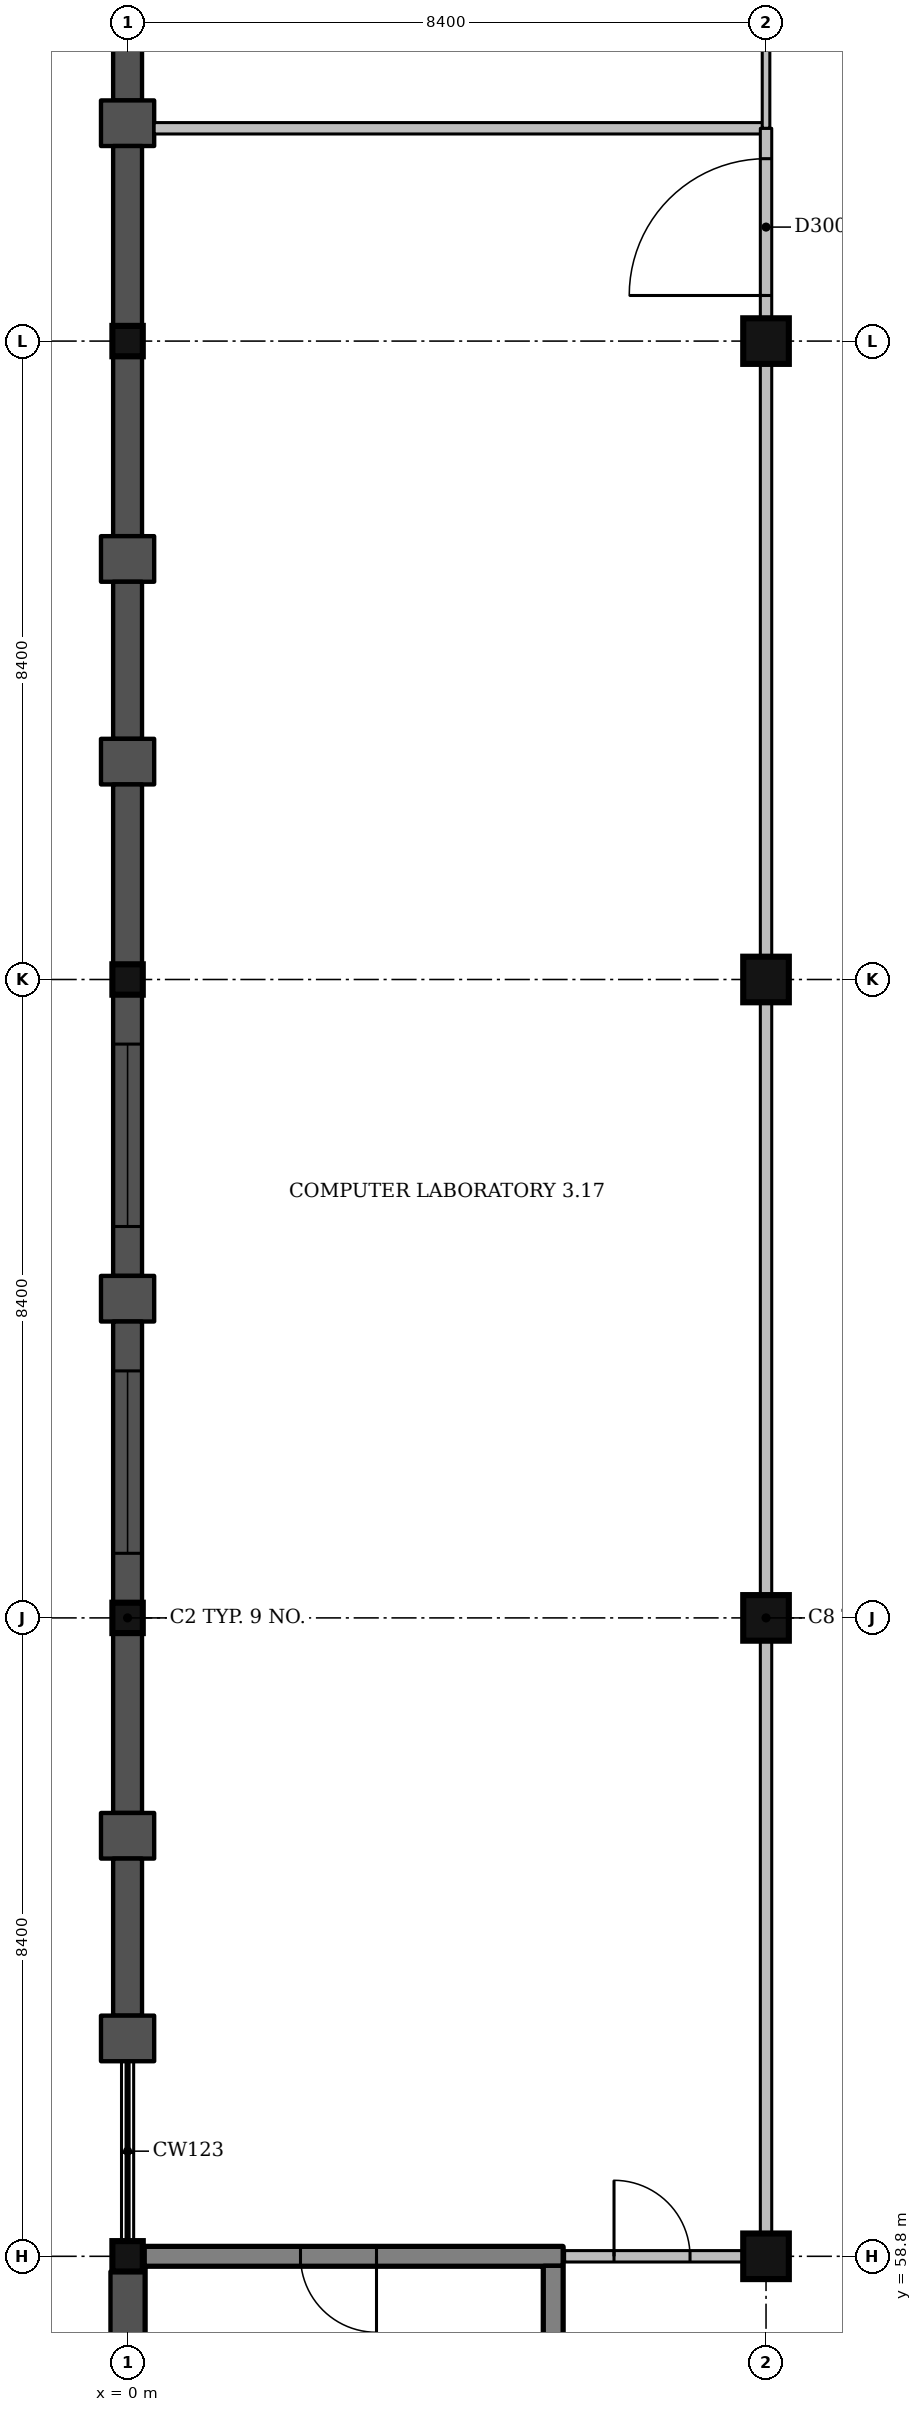
"""IFC4 building model, lengths in metres.
Left out: names, types, materials, properties, quantities, classifications, styles, units other than length and angle.
Written with IfcOpenShell. Run it as: python <this file> out.ifc"""

import sys

from ifc_helpers import new_model, si_unit, direction, frame, frame_2d, origin, origin_2d, place, context, subcontext, project, spatial, rectangle, extrude, element, fill, save


model = new_model("IFC4")
c1 = context("Model", 3, precision=1e-05, world=origin(), true_north=direction((0.0, 1.0)))
c2 = subcontext(c1, "Body", "Model", "MODEL_VIEW")
j1 = project(units=[si_unit("LENGTHUNIT", "METRE"), si_unit("PLANEANGLEUNIT", "RADIAN")], contexts=[c1])
p1 = place(None, origin())
s1 = spatial("IfcSite", under=j1, at=p1, CompositionType="ELEMENT")
p2 = place(p1, origin())
s2 = spatial("IfcBuilding", under=s1, at=p2, CompositionType="ELEMENT")
p3 = place(p2, frame((0.0, 0.0, 13.5)))
s3 = spatial("IfcBuildingStorey", under=s2, at=p3, CompositionType="ELEMENT", Elevation=13.5)
for number, where, z_axis, x_axis in (
    (1, (0.0, 58.8, 0.0), (0.0, 0.0, 1.0), (1.0, 0.0, 0.0)),
    (2, (0.0, 67.2, 0.0), (0.0, 0.0, 1.0), (1.0, 0.0, 0.0)),
    (3, (0.0, 75.6, 0.0), (0.0, 0.0, 1.0), (1.0, 0.0, 0.0)),
    (4, (0.0, 84.0, 0.0), (0.0, 0.0, 1.0), (1.0, 0.0, 0.0)),
):
    element("IfcColumn", number, at=place(p3, frame(where, z_axis=z_axis, x_axis=x_axis)), inside=s3, PredefinedType="COLUMN", context=c2, shape_type="SweptSolid", body=[
        extrude(rectangle(XDim=0.4, YDim=0.4, at=origin_2d()), origin(), (0.0, 0.0, 1.0), 4.5),
    ])
for number, where, z_axis, x_axis in (
    (5, (8.4, 58.8, 0.0), (0.0, 0.0, 1.0), (1.0, 0.0, 0.0)),
    (6, (8.4, 67.2, 0.0), (0.0, 0.0, 1.0), (1.0, 0.0, 0.0)),
    (7, (8.4, 75.6, 0.0), (0.0, 0.0, 1.0), (1.0, 0.0, 0.0)),
    (8, (8.4, 84.0, 0.0), (0.0, 0.0, 1.0), (1.0, 0.0, 0.0)),
):
    element("IfcColumn", number, at=place(p3, frame(where, z_axis=z_axis, x_axis=x_axis)), inside=s3, PredefinedType="COLUMN", context=c2, shape_type="SweptSolid", body=[
        extrude(rectangle(XDim=0.6, YDim=0.6, at=origin_2d()), origin(), (0.0, 0.0, 1.0), 4.5),
    ])
p4 = place(p3, frame((0.225, 58.8, 0.0), z_axis=(0.0, 0.0, 1.0), x_axis=(1.0, 0.0, 0.0)))
e9 = element("IfcWall", 9, at=p4, inside=s3, PredefinedType="SHEAR", context=c2, shape_type="SweptSolid", body=[
    extrude(rectangle(XDim=5.5, YDim=0.25, at=frame_2d((2.75, 0.0))), origin(), (0.0, 0.0, 1.0), 4.5),
])
p5 = place(p4, frame((2.05, 0.0, 0.0)))
e10 = element("IfcOpeningElement", 10, at=p5, cuts=e9, PredefinedType="OPENING", context=c2, shape_type="SweptSolid", body=[
    extrude(rectangle(XDim=1.0, YDim=2.1, at=frame_2d((0.5, 1.05))), frame((0.0, 0.135, 0.0), z_axis=(0.0, -1.0, 0.0), x_axis=(1.0, 0.0, 0.0)), (0.0, 0.0, 1.0), 0.27),
])
p6 = place(p3, frame((5.6, 54.61, 0.0), z_axis=(0.0, 0.0, 1.0), x_axis=(0.0, 1.0, 0.0)))
e11 = element("IfcWall", 11, at=p6, inside=s3, PredefinedType="SHEAR", context=c2, shape_type="SweptSolid", body=[
    extrude(rectangle(XDim=4.065, YDim=0.25, at=frame_2d((2.032, 0.0))), origin(), (0.0, 0.0, 1.0), 4.5),
])
p7 = place(p3, frame((0.0, 89.233, 0.0), z_axis=(0.0, 0.0, 1.0), x_axis=(0.0, -1.0, 0.0)))
e12 = element("IfcWall", 12, at=p7, inside=s3, PredefinedType="SOLIDWALL", context=c2, shape_type="SweptSolid", body=[
    extrude(rectangle(XDim=2.067, YDim=0.38, at=frame_2d((1.033, 0.0))), origin(), (0.0, 0.0, 1.0), 3.35),
])
p8 = place(p7, frame((0.733, 0.0, 1.5)))
e13 = element("IfcOpeningElement", 13, at=p8, cuts=e12, PredefinedType="OPENING", context=c2, shape_type="SweptSolid", body=[
    extrude(rectangle(XDim=0.6, YDim=1.2, at=frame_2d((0.3, 0.6))), frame((0.0, 0.2, 0.0), z_axis=(0.0, -1.0, 0.0), x_axis=(1.0, 0.0, 0.0)), (0.0, 0.0, 1.0), 0.4),
])
p9 = place(p3, frame((0.0, 87.167, 0.0), z_axis=(0.0, 0.0, 1.0), x_axis=(0.0, -1.0, 0.0)))
e14 = element("IfcWall", 14, at=p9, inside=s3, PredefinedType="SOLIDWALL", context=c2, shape_type="SweptSolid", body=[
    extrude(rectangle(XDim=0.6, YDim=0.7, at=frame_2d((0.3, 0.0))), origin(), (0.0, 0.0, 1.0), 3.35),
])
for number, where, z_axis, x_axis in (
    (15, (0.0, 86.567, 0.0), (0.0, 0.0, 1.0), (0.0, -1.0, 0.0)),
    (16, (0.0, 83.8, 0.0), (0.0, 0.0, 1.0), (0.0, -1.0, 0.0)),
):
    element("IfcWall", number, at=place(p3, frame(where, z_axis=z_axis, x_axis=x_axis)), inside=s3, PredefinedType="SOLIDWALL", context=c2, shape_type="SweptSolid", body=[
        extrude(rectangle(XDim=2.367, YDim=0.38, at=frame_2d((1.183, 0.0))), origin(), (0.0, 0.0, 1.0), 3.35),
    ])
p10 = place(p3, frame((0.0, 81.433, 0.0), z_axis=(0.0, 0.0, 1.0), x_axis=(0.0, -1.0, 0.0)))
e17 = element("IfcWall", 17, at=p10, inside=s3, PredefinedType="SOLIDWALL", context=c2, shape_type="SweptSolid", body=[
    extrude(rectangle(XDim=0.6, YDim=0.7, at=frame_2d((0.3, 0.0))), origin(), (0.0, 0.0, 1.0), 3.35),
])
p11 = place(p3, frame((0.0, 80.833, 0.0), z_axis=(0.0, 0.0, 1.0), x_axis=(0.0, -1.0, 0.0)))
e18 = element("IfcWall", 18, at=p11, inside=s3, PredefinedType="SOLIDWALL", context=c2, shape_type="SweptSolid", body=[
    extrude(rectangle(XDim=2.067, YDim=0.38, at=frame_2d((1.033, 0.0))), origin(), (0.0, 0.0, 1.0), 3.35),
])
p12 = place(p3, frame((0.0, 78.767, 0.0), z_axis=(0.0, 0.0, 1.0), x_axis=(0.0, -1.0, 0.0)))
e19 = element("IfcWall", 19, at=p12, inside=s3, PredefinedType="SOLIDWALL", context=c2, shape_type="SweptSolid", body=[
    extrude(rectangle(XDim=0.6, YDim=0.7, at=frame_2d((0.3, 0.0))), origin(), (0.0, 0.0, 1.0), 3.35),
])
p13 = place(p3, frame((0.0, 78.167, 0.0), z_axis=(0.0, 0.0, 1.0), x_axis=(0.0, -1.0, 0.0)))
e20 = element("IfcWall", 20, at=p13, inside=s3, PredefinedType="SOLIDWALL", context=c2, shape_type="SweptSolid", body=[
    extrude(rectangle(XDim=2.367, YDim=0.38, at=frame_2d((1.183, 0.0))), origin(), (0.0, 0.0, 1.0), 3.35),
])
p14 = place(p3, frame((0.0, 75.4, 0.0), z_axis=(0.0, 0.0, 1.0), x_axis=(0.0, -1.0, 0.0)))
e21 = element("IfcWall", 21, at=p14, inside=s3, PredefinedType="SOLIDWALL", context=c2, shape_type="SweptSolid", body=[
    extrude(rectangle(XDim=3.7, YDim=0.38, at=frame_2d((1.85, 0.0))), origin(), (0.0, 0.0, 1.0), 3.35),
])
p15 = place(p14, frame((0.65, 0.0, 1.2)))
e22 = element("IfcOpeningElement", 22, at=p15, cuts=e21, PredefinedType="OPENING", context=c2, shape_type="SweptSolid", body=[
    extrude(rectangle(XDim=2.4, YDim=1.5, at=frame_2d((1.2, 0.75))), frame((0.0, 0.2, 0.0), z_axis=(0.0, -1.0, 0.0), x_axis=(1.0, 0.0, 0.0)), (0.0, 0.0, 1.0), 0.4),
])
p16 = place(p3, frame((0.0, 71.7, 0.0), z_axis=(0.0, 0.0, 1.0), x_axis=(0.0, -1.0, 0.0)))
e23 = element("IfcWall", 23, at=p16, inside=s3, PredefinedType="SOLIDWALL", context=c2, shape_type="SweptSolid", body=[
    extrude(rectangle(XDim=0.6, YDim=0.7, at=frame_2d((0.3, 0.0))), origin(), (0.0, 0.0, 1.0), 3.35),
])
p17 = place(p3, frame((0.0, 71.1, 0.0), z_axis=(0.0, 0.0, 1.0), x_axis=(0.0, -1.0, 0.0)))
e24 = element("IfcWall", 24, at=p17, inside=s3, PredefinedType="SOLIDWALL", context=c2, shape_type="SweptSolid", body=[
    extrude(rectangle(XDim=3.7, YDim=0.38, at=frame_2d((1.85, 0.0))), origin(), (0.0, 0.0, 1.0), 3.35),
])
p18 = place(p17, frame((0.65, 0.0, 1.2)))
e25 = element("IfcOpeningElement", 25, at=p18, cuts=e24, PredefinedType="OPENING", context=c2, shape_type="SweptSolid", body=[
    extrude(rectangle(XDim=2.4, YDim=1.5, at=frame_2d((1.2, 0.75))), frame((0.0, 0.2, 0.0), z_axis=(0.0, -1.0, 0.0), x_axis=(1.0, 0.0, 0.0)), (0.0, 0.0, 1.0), 0.4),
])
p19 = place(p3, frame((0.0, 67.0, 0.0), z_axis=(0.0, 0.0, 1.0), x_axis=(0.0, -1.0, 0.0)))
e26 = element("IfcWall", 26, at=p19, inside=s3, PredefinedType="SOLIDWALL", context=c2, shape_type="SweptSolid", body=[
    extrude(rectangle(XDim=2.367, YDim=0.38, at=frame_2d((1.183, 0.0))), origin(), (0.0, 0.0, 1.0), 3.35),
])
p20 = place(p3, frame((0.0, 64.633, 0.0), z_axis=(0.0, 0.0, 1.0), x_axis=(0.0, -1.0, 0.0)))
e27 = element("IfcWall", 27, at=p20, inside=s3, PredefinedType="SOLIDWALL", context=c2, shape_type="SweptSolid", body=[
    extrude(rectangle(XDim=0.6, YDim=0.7, at=frame_2d((0.3, 0.0))), origin(), (0.0, 0.0, 1.0), 3.35),
])
p21 = place(p3, frame((0.0, 64.033, 0.0), z_axis=(0.0, 0.0, 1.0), x_axis=(0.0, -1.0, 0.0)))
e28 = element("IfcWall", 28, at=p21, inside=s3, PredefinedType="SOLIDWALL", context=c2, shape_type="SweptSolid", body=[
    extrude(rectangle(XDim=2.066, YDim=0.38, at=frame_2d((1.033, 0.0))), origin(), (0.0, 0.0, 1.0), 3.35),
])
p22 = place(p3, frame((0.0, 61.967, 0.0), z_axis=(0.0, 0.0, 1.0), x_axis=(0.0, -1.0, 0.0)))
e29 = element("IfcWall", 29, at=p22, inside=s3, PredefinedType="SOLIDWALL", context=c2, shape_type="SweptSolid", body=[
    extrude(rectangle(XDim=0.6, YDim=0.7, at=frame_2d((0.3, 0.0))), origin(), (0.0, 0.0, 1.0), 3.35),
])
p23 = place(p3, frame((0.0, 58.6, 0.0), z_axis=(0.0, 0.0, 1.0), x_axis=(0.0, -1.0, 0.0)))
e30 = element("IfcWall", 30, at=p23, inside=s3, PredefinedType="SOLIDWALL", context=c2, shape_type="SweptSolid", body=[
    extrude(rectangle(XDim=3.675, YDim=0.45, at=frame_2d((1.837, 0.0))), origin(), (0.0, 0.0, 1.0), 4.5),
])
p24 = place(p3, frame((5.75, 58.8, 0.0), z_axis=(0.0, 0.0, 1.0), x_axis=(1.0, 0.0, 0.0)))
e31 = element("IfcWall", 31, at=p24, inside=s3, PredefinedType="PARTITIONING", context=c2, shape_type="SweptSolid", body=[
    extrude(rectangle(XDim=2.35, YDim=0.15, at=frame_2d((1.175, 0.0))), origin(), (0.0, 0.0, 1.0), 3.5),
])
p25 = place(p24, frame((0.65, 0.0, 0.0)))
e32 = element("IfcOpeningElement", 32, at=p25, cuts=e31, PredefinedType="OPENING", context=c2, shape_type="SweptSolid", body=[
    extrude(rectangle(XDim=1.0, YDim=2.1, at=frame_2d((0.5, 1.05))), frame((0.0, 0.085, 0.0), z_axis=(0.0, -1.0, 0.0), x_axis=(1.0, 0.0, 0.0)), (0.0, 0.0, 1.0), 0.17),
])
p26 = place(p3, frame((0.35, 86.8, 0.0), z_axis=(0.0, 0.0, 1.0), x_axis=(1.0, 0.0, 0.0)))
e33 = element("IfcWall", 33, at=p26, inside=s3, PredefinedType="PARTITIONING", context=c2, shape_type="SweptSolid", body=[
    extrude(rectangle(XDim=8.05, YDim=0.15, at=frame_2d((4.025, 0.0))), origin(), (0.0, 0.0, 1.0), 3.4),
])
p27 = place(p3, frame((8.4, 59.1, 0.0), z_axis=(0.0, 0.0, 1.0), x_axis=(0.0, 1.0, 0.0)))
e34 = element("IfcWall", 34, at=p27, inside=s3, PredefinedType="PARTITIONING", context=c2, shape_type="SweptSolid", body=[
    extrude(rectangle(XDim=7.8, YDim=0.15, at=frame_2d((3.9, 0.0))), origin(), (0.0, 0.0, 1.0), 3.4),
])
for number, where, z_axis, x_axis in (
    (35, (8.4, 67.5, 0.0), (0.0, 0.0, 1.0), (0.0, 1.0, 0.0)),
    (36, (8.4, 75.9, 0.0), (0.0, 0.0, 1.0), (0.0, 1.0, 0.0)),
):
    element("IfcWall", number, at=place(p3, frame(where, z_axis=z_axis, x_axis=x_axis)), inside=s3, PredefinedType="PARTITIONING", context=c2, shape_type="SweptSolid", body=[
        extrude(rectangle(XDim=7.8, YDim=0.15, at=frame_2d((3.9, 0.0))), origin(), (0.0, 0.0, 1.0), 3.4),
    ])
p28 = place(p3, frame((8.4, 84.3, 0.0), z_axis=(0.0, 0.0, 1.0), x_axis=(0.0, 1.0, 0.0)))
e37 = element("IfcWall", 37, at=p28, inside=s3, PredefinedType="PARTITIONING", context=c2, shape_type="SweptSolid", body=[
    extrude(rectangle(XDim=2.5, YDim=0.15, at=frame_2d((1.25, 0.0))), origin(), (0.0, 0.0, 1.0), 3.4),
])
p29 = place(p28, frame((0.3, 0.0, 0.0)))
e38 = element("IfcOpeningElement", 38, at=p29, cuts=e37, PredefinedType="OPENING", context=c2, shape_type="SweptSolid", body=[
    extrude(rectangle(XDim=1.8, YDim=2.1, at=frame_2d((0.9, 1.05))), frame((0.0, 0.085, 0.0), z_axis=(0.0, -1.0, 0.0), x_axis=(1.0, 0.0, 0.0)), (0.0, 0.0, 1.0), 0.17),
])
p30 = place(p3, frame((8.4, 86.8, 0.0), z_axis=(0.0, 0.0, 1.0), x_axis=(0.0, 1.0, 0.0)))
e39 = element("IfcWall", 39, at=p30, inside=s3, PredefinedType="PARTITIONING", context=c2, shape_type="SweptSolid", body=[
    extrude(rectangle(XDim=5.3, YDim=0.1, at=frame_2d((2.65, 0.0))), origin(), (0.0, 0.0, 1.0), 3.4),
])
p31 = place(p30, frame((1.7, 0.0, 0.0)))
e40 = element("IfcOpeningElement", 40, at=p31, cuts=e39, PredefinedType="OPENING", context=c2, shape_type="SweptSolid", body=[
    extrude(rectangle(XDim=0.9, YDim=2.1, at=frame_2d((0.45, 1.05))), frame((0.0, 0.06, 0.0), z_axis=(0.0, -1.0, 0.0), x_axis=(1.0, 0.0, 0.0)), (0.0, 0.0, 1.0), 0.12),
])
p32 = place(p15, origin())
e41 = element("IfcWindow", 41, at=p32, inside=s3, PartitioningType="SINGLE_PANEL", PredefinedType="WINDOW", context=c2, shape_type="SweptSolid", body=[
    extrude(rectangle(XDim=2.4, YDim=1.5, at=frame_2d((1.2, 0.75))), frame((0.0, 0.15, 0.0), z_axis=(0.0, -1.0, 0.0), x_axis=(1.0, 0.0, 0.0)), (0.0, 0.0, 1.0), 0.06),
])
fill(e22, e41)
p33 = place(p18, origin())
e42 = element("IfcWindow", 42, at=p33, inside=s3, PartitioningType="SINGLE_PANEL", PredefinedType="WINDOW", context=c2, shape_type="SweptSolid", body=[
    extrude(rectangle(XDim=2.4, YDim=1.5, at=frame_2d((1.2, 0.75))), frame((0.0, 0.15, 0.0), z_axis=(0.0, -1.0, 0.0), x_axis=(1.0, 0.0, 0.0)), (0.0, 0.0, 1.0), 0.06),
])
fill(e25, e42)
p34 = place(p25, origin())
e43 = element("IfcDoor", 43, at=p34, inside=s3, OperationType="SINGLE_SWING_LEFT", PredefinedType="DOOR", context=c2, shape_type="SweptSolid", body=[
    extrude(rectangle(XDim=1.0, YDim=2.1, at=frame_2d((0.5, 1.05))), frame((0.0, 0.025, 0.0), z_axis=(0.0, -1.0, 0.0), x_axis=(1.0, 0.0, 0.0)), (0.0, 0.0, 1.0), 0.05),
])
fill(e32, e43)
p35 = place(p29, origin())
e44 = element("IfcDoor", 44, at=p35, inside=s3, OperationType="DOUBLE_DOOR_SINGLE_SWING", PredefinedType="DOOR", context=c2, shape_type="SweptSolid", body=[
    extrude(rectangle(XDim=1.8, YDim=2.1, at=frame_2d((0.9, 1.05))), frame((0.0, 0.025, 0.0), z_axis=(0.0, -1.0, 0.0), x_axis=(1.0, 0.0, 0.0)), (0.0, 0.0, 1.0), 0.05),
])
fill(e38, e44)
p36 = place(p5, origin())
e45 = element("IfcDoor", 45, at=p36, inside=s3, OperationType="SINGLE_SWING_RIGHT", PredefinedType="DOOR", context=c2, shape_type="SweptSolid", body=[
    extrude(rectangle(XDim=1.0, YDim=2.1, at=frame_2d((0.5, 1.05))), frame((0.0, 0.025, 0.0), z_axis=(0.0, -1.0, 0.0), x_axis=(1.0, 0.0, 0.0)), (0.0, 0.0, 1.0), 0.05),
])
fill(e10, e45)
save(model, sys.argv[1])
